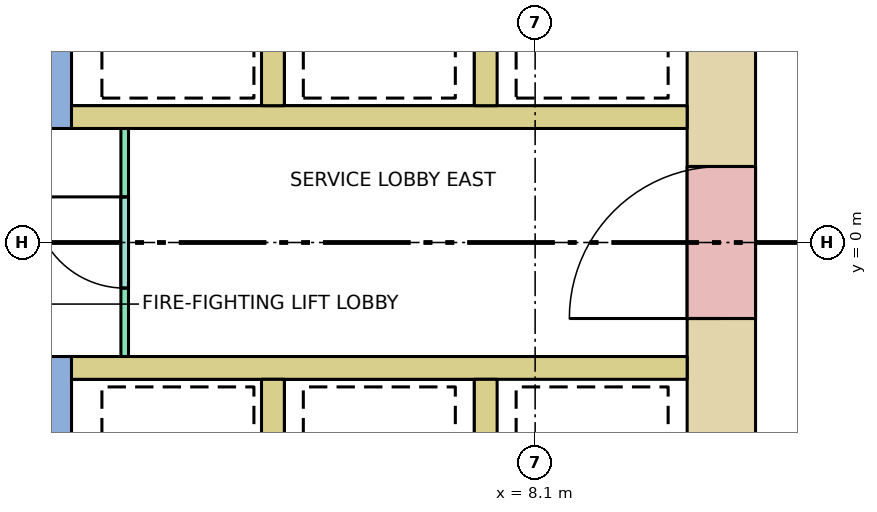
"""IFC4 building model, lengths in metres.
Left out: names, types, materials, properties, quantities, classifications, styles, units other than length and angle.
Written with IfcOpenShell. Run it as: python <this file> out.ifc"""

import sys

from ifc_helpers import new_model, si_unit, direction, frame, frame_2d, origin, place, context, subcontext, project, spatial, rectangle, extrude, element, fill, save


model = new_model("IFC4")
c1 = context("Model", 3, precision=1e-05, world=origin(), true_north=direction((0.0, 1.0)))
c2 = subcontext(c1, "Body", "Model", "MODEL_VIEW")
j1 = project(units=[si_unit("LENGTHUNIT", "METRE"), si_unit("PLANEANGLEUNIT", "RADIAN")], contexts=[c1])
p1 = place(None, origin())
s1 = spatial("IfcSite", under=j1, at=p1, CompositionType="ELEMENT")
p2 = place(p1, origin())
s2 = spatial("IfcBuilding", under=s1, at=p2, CompositionType="ELEMENT")
p3 = place(p2, frame((0.0, 0.0, 139.0)))
s3 = spatial("IfcBuildingStorey", under=s2, at=p3, CompositionType="ELEMENT", Elevation=139.0)
p4 = place(p3, frame((10.55, -5.13, -0.28), z_axis=(0.0, 0.0, 1.0), x_axis=(0.0, 1.0, 0.0)))
e1 = element("IfcWall", 1, at=p4, inside=s3, PredefinedType="SHEAR", context=c2, shape_type="SweptSolid", body=[
    extrude(rectangle(XDim=10.26, YDim=0.9, at=frame_2d((5.13, 0.0))), origin(), (0.0, 0.0, 1.0), 3.8),
])
p5 = place(p4, frame((4.13, 0.0, 0.28)))
e2 = element("IfcOpeningElement", 2, at=p5, cuts=e1, PredefinedType="OPENING", context=c2, shape_type="SweptSolid", body=[
    extrude(rectangle(XDim=2.0, YDim=2.1, at=frame_2d((1.0, 1.05))), frame((0.0, 0.46, 0.0), z_axis=(0.0, -1.0, 0.0), x_axis=(1.0, 0.0, 0.0)), (0.0, 0.0, 1.0), 0.92),
])
for number, where, z_axis, x_axis in (
    (3, (2.0, 1.65, 0.0), (0.0, 0.0, 1.0), (1.0, 0.0, 0.0)),
    (4, (2.0, -1.65, 0.0), (0.0, 0.0, 1.0), (1.0, 0.0, 0.0)),
):
    element("IfcWall", number, at=place(p3, frame(where, z_axis=z_axis, x_axis=x_axis)), inside=s3, PredefinedType="SOLIDWALL", context=c2, shape_type="SweptSolid", body=[
        extrude(rectangle(XDim=8.1, YDim=0.3, at=frame_2d((4.05, 0.0))), origin(), (0.0, 0.0, 1.0), 3.52),
    ])
for number, where, z_axis, x_axis in (
    (5, (4.65, 1.8, 0.0), (0.0, 0.0, 1.0), (0.0, 1.0, 0.0)),
    (6, (4.65, -4.2, 0.0), (0.0, 0.0, 1.0), (0.0, 1.0, 0.0)),
    (7, (7.45, 1.8, 0.0), (0.0, 0.0, 1.0), (0.0, 1.0, 0.0)),
    (8, (7.45, -4.2, 0.0), (0.0, 0.0, 1.0), (0.0, 1.0, 0.0)),
):
    element("IfcWall", number, at=place(p3, frame(where, z_axis=z_axis, x_axis=x_axis)), inside=s3, PredefinedType="SOLIDWALL", context=c2, shape_type="SweptSolid", body=[
        extrude(rectangle(XDim=2.4, YDim=0.3, at=frame_2d((1.2, 0.0))), origin(), (0.0, 0.0, 1.0), 3.52),
    ])
for number, where, z_axis, x_axis in (
    (9, (1.85, 1.5, 0.0), (0.0, 0.0, 1.0), (0.0, 1.0, 0.0)),
    (10, (1.85, -8.1, 0.0), (0.0, 0.0, 1.0), (0.0, 1.0, 0.0)),
):
    element("IfcWall", number, at=place(p3, frame(where, z_axis=z_axis, x_axis=x_axis)), inside=s3, PredefinedType="SHEAR", context=c2, shape_type="SweptSolid", body=[
        extrude(rectangle(XDim=6.6, YDim=0.3, at=frame_2d((3.3, 0.0))), origin(), (0.0, 0.0, 1.0), 3.52),
    ])
p6 = place(p3, frame((2.7, -1.5, 0.0), z_axis=(0.0, 0.0, 1.0), x_axis=(0.0, 1.0, 0.0)))
e11 = element("IfcWall", 11, at=p6, inside=s3, PredefinedType="PARTITIONING", context=c2, shape_type="SweptSolid", body=[
    extrude(rectangle(XDim=3.0, YDim=0.1, at=frame_2d((1.5, 0.0))), origin(), (0.0, 0.0, 1.0), 3.52),
])
p7 = place(p6, frame((0.9, 0.0, 0.0)))
e12 = element("IfcOpeningElement", 12, at=p7, cuts=e11, PredefinedType="OPENING", context=c2, shape_type="SweptSolid", body=[
    extrude(rectangle(XDim=1.2, YDim=2.1, at=frame_2d((0.6, 1.05))), frame((0.0, 0.06, 0.0), z_axis=(0.0, -1.0, 0.0), x_axis=(1.0, 0.0, 0.0)), (0.0, 0.0, 1.0), 0.12),
])
p8 = place(p5, origin())
e13 = element("IfcDoor", 13, at=p8, inside=s3, OperationType="DOUBLE_DOOR_SINGLE_SWING", PredefinedType="DOOR", context=c2, shape_type="SweptSolid", body=[
    extrude(rectangle(XDim=2.0, YDim=2.1, at=frame_2d((1.0, 1.05))), frame((0.0, 0.025, 0.0), z_axis=(0.0, -1.0, 0.0), x_axis=(1.0, 0.0, 0.0)), (0.0, 0.0, 1.0), 0.05),
])
fill(e2, e13)
p9 = place(p7, origin())
e14 = element("IfcDoor", 14, at=p9, inside=s3, OperationType="SINGLE_SWING_RIGHT", PredefinedType="DOOR", context=c2, shape_type="SweptSolid", body=[
    extrude(rectangle(XDim=1.2, YDim=2.1, at=frame_2d((0.6, 1.05))), frame((0.0, 0.025, 0.0), z_axis=(0.0, -1.0, 0.0), x_axis=(1.0, 0.0, 0.0)), (0.0, 0.0, 1.0), 0.05),
])
fill(e12, e14)
save(model, sys.argv[1])
